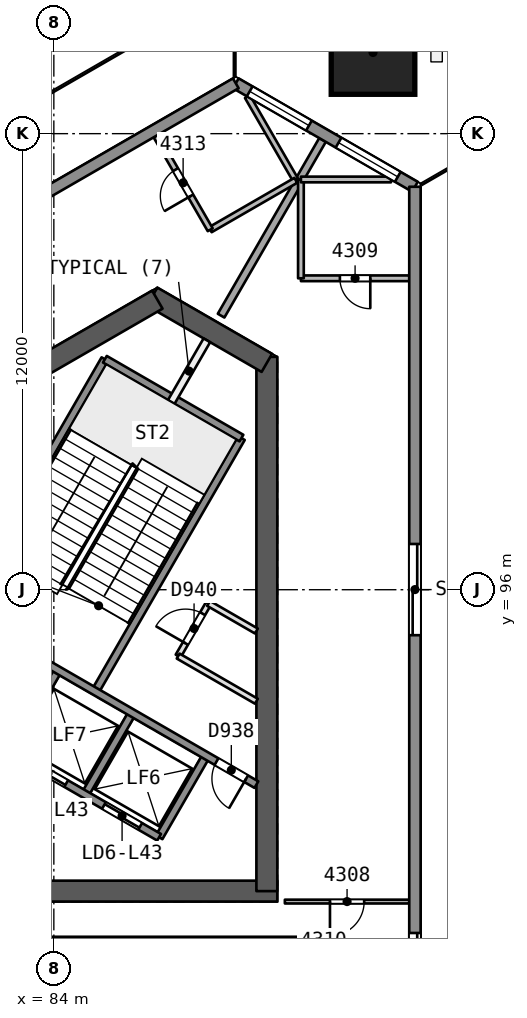
"""IFC4 building model, lengths in metres.
Left out: names, types, materials, properties, quantities, classifications, styles, units other than length and angle.
Written with IfcOpenShell. Run it as: python <this file> out.ifc"""

import sys

from ifc_helpers import new_model, si_unit, direction, frame, frame_2d, origin, origin_2d, place, context, subcontext, project, spatial, rectangle, extrude, element, fill, save


model = new_model("IFC4")
c1 = context("Model", 3, precision=1e-05, world=origin(), true_north=direction((0.0, 1.0)))
c2 = subcontext(c1, "Body", "Model", "MODEL_VIEW")
j1 = project(units=[si_unit("LENGTHUNIT", "METRE"), si_unit("PLANEANGLEUNIT", "RADIAN")], contexts=[c1])
p1 = place(None, origin())
s1 = spatial("IfcSite", under=j1, at=p1, CompositionType="ELEMENT")
p2 = place(p1, origin())
s2 = spatial("IfcBuilding", under=s1, at=p2, CompositionType="ELEMENT")
p3 = place(p2, frame((0.0, 0.0, 178.5)))
s3 = spatial("IfcBuildingStorey", under=s2, at=p3, CompositionType="ELEMENT", Elevation=178.5)
p4 = place(p3, frame((79.659, 88.069, 0.0), z_axis=(0.0, 0.0, 1.0), x_axis=(1.0, 0.0, 0.0)))
e1 = element("IfcWall", 1, at=p4, inside=s3, PredefinedType="SHEAR", context=c2, shape_type="SweptSolid", body=[
    extrude(rectangle(XDim=10.221, YDim=0.55, at=frame_2d((5.111, 0.0))), origin(), (0.0, 0.0, 1.0), 3.7),
])
p5 = place(p4, frame((0.791, 0.0, 0.0)))
e2 = element("IfcOpeningElement", 2, at=p5, cuts=e1, PredefinedType="OPENING", context=c2, shape_type="SweptSolid", body=[
    extrude(rectangle(XDim=1.2, YDim=2.1, at=frame_2d((0.6, 1.05))), frame((0.0, 0.286, 0.0), z_axis=(0.0, -1.0, 0.0), x_axis=(1.0, 0.0, 0.0)), (0.0, 0.0, 1.0), 0.571),
])
p6 = place(p3, frame((89.605, 88.069, 0.0), z_axis=(0.0, 0.0, 1.0), x_axis=(0.0, 1.0, 0.0)))
e3 = element("IfcWall", 3, at=p6, inside=s3, PredefinedType="SHEAR", context=c2, shape_type="SweptSolid", body=[
    extrude(rectangle(XDim=14.058, YDim=0.55, at=frame_2d((7.029, 0.0))), origin(), (0.0, 0.0, 1.0), 3.7),
])
p7 = place(p3, frame((89.605, 101.969, 0.0), z_axis=(0.0, 0.0, 1.0), x_axis=(-0.865997833373, 0.500047750313, 0.0)))
e4 = element("IfcWall", 4, at=p7, inside=s3, PredefinedType="SHEAR", context=c2, shape_type="SweptSolid", body=[
    extrude(rectangle(XDim=3.487, YDim=0.55, at=frame_2d((1.743, 0.0))), origin(), (0.0, 0.0, 1.0), 3.7),
])
p8 = place(p3, frame((86.723, 103.633, 0.0), z_axis=(0.0, 0.0, 1.0), x_axis=(-0.866023530946, -0.500003243837, 0.0)))
e5 = element("IfcWall", 5, at=p8, inside=s3, PredefinedType="SHEAR", context=c2, shape_type="SweptSolid", body=[
    extrude(rectangle(XDim=14.175, YDim=0.55, at=frame_2d((7.087, 0.0))), origin(), (0.0, 0.0, 1.0), 3.7),
])
p9 = place(p3, frame((92.42, 110.172, 0.0), z_axis=(-0.017607001884, -0.030531992032, 0.999378702468), x_axis=(0.499253360369, 0.865738917404, 0.035244986208)))
e6 = element("IfcColumn", 6, at=p9, inside=s3, PredefinedType="COLUMN", context=c2, shape_type="SweptSolid", body=[
    extrude(rectangle(XDim=2.2, YDim=2.2, at=origin_2d()), origin(), (0.0, 0.0, 1.0), 3.702),
])
p10 = place(p3, frame((93.353, 87.794, 0.0), z_axis=(0.0, 0.0, 1.0), x_axis=(-1.0, 0.0, 0.0)))
e7 = element("IfcWall", 7, at=p10, inside=s3, PredefinedType="PARTITIONING", context=c2, shape_type="SweptSolid", body=[
    extrude(rectangle(XDim=3.274, YDim=0.1, at=frame_2d((1.637, 0.0))), origin(), (0.0, 0.0, 1.0), 3.25),
])
p11 = place(p10, frame((1.187, 0.0, 0.0)))
e8 = element("IfcOpeningElement", 8, at=p11, cuts=e7, PredefinedType="OPENING", context=c2, shape_type="SweptSolid", body=[
    extrude(rectangle(XDim=0.9, YDim=2.1, at=frame_2d((0.45, 1.05))), frame((0.0, 0.061, 0.0), z_axis=(0.0, -1.0, 0.0), x_axis=(1.0, 0.0, 0.0)), (0.0, 0.0, 1.0), 0.121),
])
p12 = place(p3, frame((82.1, 86.768, 0.0), z_axis=(0.0, 0.0, 1.0), x_axis=(1.0, 0.0, 0.0)))
e9 = element("IfcWall", 9, at=p12, inside=s3, PredefinedType="PARTITIONING", context=c2, shape_type="SweptSolid", body=[
    extrude(rectangle(XDim=9.0, YDim=0.2, at=frame_2d((4.5, 0.0))), origin(), (0.0, 0.0, 1.0), 3.25),
])
p13 = place(p3, frame((93.353, 104.194, 0.0), z_axis=(0.0, 0.0, 1.0), x_axis=(-1.0, 0.0, 0.0)))
e10 = element("IfcWall", 10, at=p13, inside=s3, PredefinedType="PARTITIONING", context=c2, shape_type="SweptSolid", body=[
    extrude(rectangle(XDim=2.852, YDim=0.15, at=frame_2d((1.426, 0.0))), origin(), (0.0, 0.0, 1.0), 3.25),
])
p14 = place(p13, frame((1.026, 0.0, 0.0)))
e11 = element("IfcOpeningElement", 11, at=p14, cuts=e10, PredefinedType="OPENING", context=c2, shape_type="SweptSolid", body=[
    extrude(rectangle(XDim=0.8, YDim=2.1, at=frame_2d((0.4, 1.05))), frame((0.0, 0.085, 0.0), z_axis=(0.0, -1.0, 0.0), x_axis=(1.0, 0.0, 0.0)), (0.0, 0.0, 1.0), 0.171),
])
p15 = place(p3, frame((90.501, 104.194, 0.0), z_axis=(0.0, 0.0, 1.0), x_axis=(0.0, 1.0, 0.0)))
e12 = element("IfcWall", 12, at=p15, inside=s3, PredefinedType="PARTITIONING", context=c2, shape_type="SweptSolid", body=[
    extrude(rectangle(XDim=2.6, YDim=0.15, at=frame_2d((1.3, 0.0))), origin(), (0.0, 0.0, 1.0), 3.25),
])
p16 = place(p3, frame((90.501, 106.794, 0.0), z_axis=(0.0, 0.0, 1.0), x_axis=(1.0, 0.0, 0.0)))
e13 = element("IfcWall", 13, at=p16, inside=s3, PredefinedType="PARTITIONING", context=c2, shape_type="SweptSolid", body=[
    extrude(rectangle(XDim=2.371, YDim=0.15, at=frame_2d((1.186, 0.0))), origin(), (0.0, 0.0, 1.0), 3.25),
])
p17 = place(p3, frame((91.07, 107.835, 0.0), z_axis=(0.0, 0.0, 1.0), x_axis=(-0.499970524249, -0.866042420948, 0.0)))
e14 = element("IfcWall", 14, at=p17, inside=s3, PredefinedType="PARTITIONING", context=c2, shape_type="SweptSolid", body=[
    extrude(rectangle(XDim=5.339, YDim=0.2, at=frame_2d((2.669, 0.0))), origin(), (0.0, 0.0, 1.0), 3.25),
])
p18 = place(p3, frame((89.094, 108.976, 0.0), z_axis=(0.0, 0.0, 1.0), x_axis=(0.499935570486, -0.866062598986, 0.0)))
e15 = element("IfcWall", 15, at=p18, inside=s3, PredefinedType="PARTITIONING", context=c2, shape_type="SweptSolid", body=[
    extrude(rectangle(XDim=2.545, YDim=0.15, at=frame_2d((1.272, 0.0))), origin(), (0.0, 0.0, 1.0), 3.25),
])
p19 = place(p3, frame((90.366, 106.771, 0.0), z_axis=(0.0, 0.0, 1.0), x_axis=(-0.865997922154, -0.500047596559, 0.0)))
e16 = element("IfcWall", 16, at=p19, inside=s3, PredefinedType="PARTITIONING", context=c2, shape_type="SweptSolid", body=[
    extrude(rectangle(XDim=2.6, YDim=0.15, at=frame_2d((1.3, 0.0))), origin(), (0.0, 0.0, 1.0), 3.25),
])
p20 = place(p3, frame((88.115, 105.471, 0.0), z_axis=(0.0, 0.0, 1.0), x_axis=(-0.500006551472, 0.866021621257, 0.0)))
e17 = element("IfcWall", 17, at=p20, inside=s3, PredefinedType="PARTITIONING", context=c2, shape_type="SweptSolid", body=[
    extrude(rectangle(XDim=2.852, YDim=0.15, at=frame_2d((1.426, 0.0))), origin(), (0.0, 0.0, 1.0), 3.25),
])
p21 = place(p20, frame((1.026, 0.0, 0.0)))
e18 = element("IfcOpeningElement", 18, at=p21, cuts=e17, PredefinedType="OPENING", context=c2, shape_type="SweptSolid", body=[
    extrude(rectangle(XDim=0.8, YDim=2.1, at=frame_2d((0.4, 1.05))), frame((0.0, 0.085, 0.0), z_axis=(0.0, -1.0, 0.0), x_axis=(1.0, 0.0, 0.0)), (0.0, 0.0, 1.0), 0.171),
])
p22 = place(p3, frame((88.788, 109.324, 0.0), z_axis=(0.0, 0.0, 1.0), x_axis=(0.866026498114, -0.499998104561, 0.0)))
e19 = element("IfcWall", 19, at=p22, inside=s3, PredefinedType="SOLIDWALL", context=c2, shape_type="SweptSolid", body=[
    extrude(rectangle(XDim=5.443, YDim=0.3, at=frame_2d((2.722, 0.0))), origin(), (0.0, 0.0, 1.0), 3.25),
])
p23 = place(p22, frame((3.122, 0.0, 0.9)))
e20 = element("IfcOpeningElement", 20, at=p23, cuts=e19, PredefinedType="OPENING", context=c2, shape_type="SweptSolid", body=[
    extrude(rectangle(XDim=1.8, YDim=1.5, at=frame_2d((0.9, 0.75))), frame((0.0, 0.161, 0.0), z_axis=(0.0, -1.0, 0.0), x_axis=(1.0, 0.0, 0.0)), (0.0, 0.0, 1.0), 0.321),
])
p24 = place(p22, frame((0.423, 0.0, 0.9)))
e21 = element("IfcOpeningElement", 21, at=p24, cuts=e19, PredefinedType="OPENING", context=c2, shape_type="SweptSolid", body=[
    extrude(rectangle(XDim=1.8, YDim=1.5, at=frame_2d((0.9, 0.75))), frame((0.0, 0.161, 0.0), z_axis=(0.0, -1.0, 0.0), x_axis=(1.0, 0.0, 0.0)), (0.0, 0.0, 1.0), 0.321),
])
p25 = place(p3, frame((93.502, 106.603, 0.0), z_axis=(0.0, 0.0, 1.0), x_axis=(0.0, -1.0, 0.0)))
e22 = element("IfcWall", 22, at=p25, inside=s3, PredefinedType="SOLIDWALL", context=c2, shape_type="SweptSolid", body=[
    extrude(rectangle(XDim=53.206, YDim=0.3, at=frame_2d((26.603, 0.0))), origin(), (0.0, 0.0, 1.0), 3.25),
])
p26 = place(p25, frame((31.015, 0.0, 0.0)))
e23 = element("IfcOpeningElement", 23, at=p26, cuts=e22, PredefinedType="OPENING", context=c2, shape_type="SweptSolid", body=[
    extrude(rectangle(XDim=2.4, YDim=2.4, at=frame_2d((1.2, 1.2))), frame((0.0, 0.161, 0.0), z_axis=(0.0, -1.0, 0.0), x_axis=(1.0, 0.0, 0.0)), (0.0, 0.0, 1.0), 0.321),
])
p27 = place(p25, frame((41.356, 0.0, 0.0)))
e24 = element("IfcOpeningElement", 24, at=p27, cuts=e22, PredefinedType="OPENING", context=c2, shape_type="SweptSolid", body=[
    extrude(rectangle(XDim=2.4, YDim=2.4, at=frame_2d((1.2, 1.2))), frame((0.0, 0.161, 0.0), z_axis=(0.0, -1.0, 0.0), x_axis=(1.0, 0.0, 0.0)), (0.0, 0.0, 1.0), 0.321),
])
p28 = place(p25, frame((19.635, 0.0, 0.0)))
e25 = element("IfcOpeningElement", 25, at=p28, cuts=e22, PredefinedType="OPENING", context=c2, shape_type="SweptSolid", body=[
    extrude(rectangle(XDim=2.4, YDim=2.4, at=frame_2d((1.2, 1.2))), frame((0.0, 0.161, 0.0), z_axis=(0.0, -1.0, 0.0), x_axis=(1.0, 0.0, 0.0)), (0.0, 0.0, 1.0), 0.321),
])
p29 = place(p25, frame((9.4, 0.0, 0.0)))
e26 = element("IfcOpeningElement", 26, at=p29, cuts=e22, PredefinedType="OPENING", context=c2, shape_type="SweptSolid", body=[
    extrude(rectangle(XDim=2.4, YDim=2.4, at=frame_2d((1.2, 1.2))), frame((0.0, 0.161, 0.0), z_axis=(0.0, -1.0, 0.0), x_axis=(1.0, 0.0, 0.0)), (0.0, 0.0, 1.0), 0.321),
])
p30 = place(p25, frame((25.247, 0.0, 0.0)))
e27 = element("IfcOpeningElement", 27, at=p30, cuts=e22, PredefinedType="OPENING", context=c2, shape_type="SweptSolid", body=[
    extrude(rectangle(XDim=2.4, YDim=2.4, at=frame_2d((1.2, 1.2))), frame((0.0, 0.161, 0.0), z_axis=(0.0, -1.0, 0.0), x_axis=(1.0, 0.0, 0.0)), (0.0, 0.0, 1.0), 0.321),
])
p31 = place(p3, frame((42.71, 82.722, 0.0), z_axis=(0.0, 0.0, 1.0), x_axis=(0.866026647012, 0.499997846661, 0.0)))
e28 = element("IfcWall", 28, at=p31, inside=s3, PredefinedType="SOLIDWALL", context=c2, shape_type="SweptSolid", body=[
    extrude(rectangle(XDim=53.206, YDim=0.3, at=frame_2d((26.603, 0.0))), origin(), (0.0, 0.0, 1.0), 3.25),
])
p32 = place(p31, frame((30.391, 0.0, 0.0)))
e29 = element("IfcOpeningElement", 29, at=p32, cuts=e28, PredefinedType="OPENING", context=c2, shape_type="SweptSolid", body=[
    extrude(rectangle(XDim=2.4, YDim=2.4, at=frame_2d((1.2, 1.2))), frame((0.0, 0.161, 0.0), z_axis=(0.0, -1.0, 0.0), x_axis=(1.0, 0.0, 0.0)), (0.0, 0.0, 1.0), 0.321),
])
p33 = place(p31, frame((41.356, 0.0, 0.0)))
e30 = element("IfcOpeningElement", 30, at=p33, cuts=e28, PredefinedType="OPENING", context=c2, shape_type="SweptSolid", body=[
    extrude(rectangle(XDim=2.4, YDim=2.4, at=frame_2d((1.2, 1.2))), frame((0.0, 0.161, 0.0), z_axis=(0.0, -1.0, 0.0), x_axis=(1.0, 0.0, 0.0)), (0.0, 0.0, 1.0), 0.321),
])
p34 = place(p31, frame((19.635, 0.0, 0.0)))
e31 = element("IfcOpeningElement", 31, at=p34, cuts=e28, PredefinedType="OPENING", context=c2, shape_type="SweptSolid", body=[
    extrude(rectangle(XDim=2.4, YDim=2.4, at=frame_2d((1.2, 1.2))), frame((0.0, 0.161, 0.0), z_axis=(0.0, -1.0, 0.0), x_axis=(1.0, 0.0, 0.0)), (0.0, 0.0, 1.0), 0.321),
])
p35 = place(p31, frame((9.4, 0.0, 0.0)))
e32 = element("IfcOpeningElement", 32, at=p35, cuts=e28, PredefinedType="OPENING", context=c2, shape_type="SweptSolid", body=[
    extrude(rectangle(XDim=2.4, YDim=2.4, at=frame_2d((1.2, 1.2))), frame((0.0, 0.161, 0.0), z_axis=(0.0, -1.0, 0.0), x_axis=(1.0, 0.0, 0.0)), (0.0, 0.0, 1.0), 0.321),
])
p36 = place(p31, frame((26.404, 0.0, 0.9)))
e33 = element("IfcOpeningElement", 33, at=p36, cuts=e28, PredefinedType="OPENING", context=c2, shape_type="SweptSolid", body=[
    extrude(rectangle(XDim=1.8, YDim=1.5, at=frame_2d((0.9, 0.75))), frame((0.0, 0.161, 0.0), z_axis=(0.0, -1.0, 0.0), x_axis=(1.0, 0.0, 0.0)), (0.0, 0.0, 1.0), 0.321),
])
p37 = place(p31, frame((23.442, 0.0, 0.9)))
e34 = element("IfcOpeningElement", 34, at=p37, cuts=e28, PredefinedType="OPENING", context=c2, shape_type="SweptSolid", body=[
    extrude(rectangle(XDim=1.8, YDim=1.5, at=frame_2d((0.9, 0.75))), frame((0.0, 0.161, 0.0), z_axis=(0.0, -1.0, 0.0), x_axis=(1.0, 0.0, 0.0)), (0.0, 0.0, 1.0), 0.321),
])
p38 = place(p3, frame((86.77, 89.486, 0.0), z_axis=(0.0, 0.0, 1.0), x_axis=(0.499961042966, 0.86604789447, 0.0)))
e35 = element("IfcWall", 35, at=p38, inside=s3, PredefinedType="SOLIDWALL", context=c2, shape_type="SweptSolid", body=[
    extrude(rectangle(XDim=2.48, YDim=0.2, at=frame_2d((1.24, 0.0))), origin(), (0.0, 0.0, 1.0), 3.25),
])
p39 = place(p3, frame((87.271, 94.254, 0.0), z_axis=(0.0, 0.0, 1.0), x_axis=(0.499995408039, 0.866028054938, 0.0)))
e36 = element("IfcWall", 36, at=p39, inside=s3, PredefinedType="PARTITIONING", context=c2, shape_type="SweptSolid", body=[
    extrude(rectangle(XDim=1.6, YDim=0.15, at=frame_2d((0.8, 0.0))), origin(), (0.0, 0.0, 1.0), 3.25),
])
p40 = place(p39, frame((0.387, 0.0, 0.0)))
e37 = element("IfcOpeningElement", 37, at=p40, cuts=e36, PredefinedType="OPENING", context=c2, shape_type="SweptSolid", body=[
    extrude(rectangle(XDim=0.9, YDim=2.1, at=frame_2d((0.45, 1.05))), frame((0.0, 0.085, 0.0), z_axis=(0.0, -1.0, 0.0), x_axis=(1.0, 0.0, 0.0)), (0.0, 0.0, 1.0), 0.171),
])
p41 = place(p3, frame((84.821, 90.611, 0.0), z_axis=(0.0, 0.0, 1.0), x_axis=(0.499961042966, 0.86604789447, 0.0)))
e38 = element("IfcWall", 38, at=p41, inside=s3, PredefinedType="SOLIDWALL", context=c2, shape_type="SweptSolid", body=[
    extrude(rectangle(XDim=2.48, YDim=0.2, at=frame_2d((1.24, 0.0))), origin(), (0.0, 0.0, 1.0), 3.25),
])
p42 = place(p3, frame((85.087, 93.321, 0.0), z_axis=(0.0, 0.0, 1.0), x_axis=(0.500019787375, 0.866013979237, 0.0)))
e39 = element("IfcWall", 39, at=p42, inside=s3, PredefinedType="SOLIDWALL", context=c2, shape_type="SweptSolid", body=[
    extrude(rectangle(XDim=7.7, YDim=0.2, at=frame_2d((3.85, 0.0))), origin(), (0.0, 0.0, 1.0), 3.25),
])
p43 = place(p3, frame((82.873, 91.736, 0.0), z_axis=(0.0, 0.0, 1.0), x_axis=(0.499961042966, 0.86604789447, 0.0)))
e40 = element("IfcWall", 40, at=p43, inside=s3, PredefinedType="SOLIDWALL", context=c2, shape_type="SweptSolid", body=[
    extrude(rectangle(XDim=2.48, YDim=0.2, at=frame_2d((1.24, 0.0))), origin(), (0.0, 0.0, 1.0), 3.25),
])
p44 = place(p3, frame((87.09, 100.94, 0.0), z_axis=(0.0, 0.0, 1.0), x_axis=(0.499951854219, 0.86605319898, 0.0)))
e41 = element("IfcWall", 41, at=p44, inside=s3, PredefinedType="PARTITIONING", context=c2, shape_type="SweptSolid", body=[
    extrude(rectangle(XDim=1.873, YDim=0.2, at=frame_2d((0.937, 0.0))), origin(), (0.0, 0.0, 1.0), 3.25),
])
p45 = place(p3, frame((81.493, 95.396, 0.0), z_axis=(0.0, 0.0, 1.0), x_axis=(0.500006057782, 0.866021906294, 0.0)))
e42 = element("IfcWall", 42, at=p45, inside=s3, PredefinedType="SOLIDWALL", context=c2, shape_type="SweptSolid", body=[
    extrude(rectangle(XDim=7.7, YDim=0.2, at=frame_2d((3.85, 0.0))), origin(), (0.0, 0.0, 1.0), 3.25),
])
p46 = place(p45, frame((0.55, 0.0, 0.0)))
e43 = element("IfcOpeningElement", 43, at=p46, cuts=e42, PredefinedType="OPENING", context=c2, shape_type="SweptSolid", body=[
    extrude(rectangle(XDim=1.1, YDim=2.1, at=frame_2d((0.55, 1.05))), frame((0.0, 0.11, 0.0), z_axis=(0.0, -1.0, 0.0), x_axis=(1.0, 0.0, 0.0)), (0.0, 0.0, 1.0), 0.221),
])
p47 = place(p3, frame((86.77, 89.486, 0.0), z_axis=(0.0, 0.0, 1.0), x_axis=(-0.86601811187, 0.500012629753, 0.0)))
e44 = element("IfcWall", 44, at=p47, inside=s3, PredefinedType="SOLIDWALL", context=c2, shape_type="SweptSolid", body=[
    extrude(rectangle(XDim=10.9, YDim=0.2, at=frame_2d((5.45, 0.0))), origin(), (0.0, 0.0, 1.0), 3.25),
])
p48 = place(p47, frame((0.575, 0.0, 0.0)))
e45 = element("IfcOpeningElement", 45, at=p48, cuts=e44, PredefinedType="OPENING", context=c2, shape_type="SweptSolid", body=[
    extrude(rectangle(XDim=1.1, YDim=2.1, at=frame_2d((0.55, 1.05))), frame((0.0, 0.11, 0.0), z_axis=(0.0, -1.0, 0.0), x_axis=(1.0, 0.0, 0.0)), (0.0, 0.0, 1.0), 0.221),
])
p49 = place(p47, frame((2.825, 0.0, 0.0)))
e46 = element("IfcOpeningElement", 46, at=p49, cuts=e44, PredefinedType="OPENING", context=c2, shape_type="SweptSolid", body=[
    extrude(rectangle(XDim=1.1, YDim=2.1, at=frame_2d((0.55, 1.05))), frame((0.0, 0.11, 0.0), z_axis=(0.0, -1.0, 0.0), x_axis=(1.0, 0.0, 0.0)), (0.0, 0.0, 1.0), 0.221),
])
p50 = place(p47, frame((5.075, 0.0, 0.0)))
e47 = element("IfcOpeningElement", 47, at=p50, cuts=e44, PredefinedType="OPENING", context=c2, shape_type="SweptSolid", body=[
    extrude(rectangle(XDim=1.1, YDim=2.1, at=frame_2d((0.55, 1.05))), frame((0.0, 0.11, 0.0), z_axis=(0.0, -1.0, 0.0), x_axis=(1.0, 0.0, 0.0)), (0.0, 0.0, 1.0), 0.221),
])
p51 = place(p47, frame((7.325, 0.0, 0.0)))
e48 = element("IfcOpeningElement", 48, at=p51, cuts=e44, PredefinedType="OPENING", context=c2, shape_type="SweptSolid", body=[
    extrude(rectangle(XDim=1.1, YDim=2.1, at=frame_2d((0.55, 1.05))), frame((0.0, 0.11, 0.0), z_axis=(0.0, -1.0, 0.0), x_axis=(1.0, 0.0, 0.0)), (0.0, 0.0, 1.0), 0.221),
])
p52 = place(p3, frame((89.33, 90.872, 0.0), z_axis=(0.0, 0.0, 1.0), x_axis=(-0.866027589512, 0.49999621419, 0.0)))
e49 = element("IfcWall", 49, at=p52, inside=s3, PredefinedType="SOLIDWALL", context=c2, shape_type="SweptSolid", body=[
    extrude(rectangle(XDim=10.524, YDim=0.2, at=frame_2d((5.262, 0.0))), origin(), (0.0, 0.0, 1.0), 3.25),
])
p53 = place(p52, frame((0.312, 0.0, 0.0)))
e50 = element("IfcOpeningElement", 50, at=p53, cuts=e49, PredefinedType="OPENING", context=c2, shape_type="SweptSolid", body=[
    extrude(rectangle(XDim=0.9, YDim=2.1, at=frame_2d((0.45, 1.05))), frame((0.0, 0.11, 0.0), z_axis=(0.0, -1.0, 0.0), x_axis=(1.0, 0.0, 0.0)), (0.0, 0.0, 1.0), 0.221),
])
p54 = place(p3, frame((89.33, 93.065, 0.0), z_axis=(0.0, 0.0, 1.0), x_axis=(-0.866041951395, 0.499971337603, 0.0)))
e51 = element("IfcWall", 51, at=p54, inside=s3, PredefinedType="PARTITIONING", context=c2, shape_type="SweptSolid", body=[
    extrude(rectangle(XDim=2.378, YDim=0.15, at=frame_2d((1.189, 0.0))), origin(), (0.0, 0.0, 1.0), 3.25),
])
p55 = place(p3, frame((89.33, 94.913, 0.0), z_axis=(0.0, 0.0, 1.0), x_axis=(-0.865981433661, 0.500076150755, 0.0)))
e52 = element("IfcWall", 52, at=p55, inside=s3, PredefinedType="PARTITIONING", context=c2, shape_type="SweptSolid", body=[
    extrude(rectangle(XDim=1.454, YDim=0.15, at=frame_2d((0.727, 0.0))), origin(), (0.0, 0.0, 1.0), 3.25),
])
p56 = place(p3, frame((88.937, 99.99, 0.0), z_axis=(0.0, 0.0, 1.0), x_axis=(-0.866004344652, 0.500036473714, 0.0)))
e53 = element("IfcWall", 53, at=p56, inside=s3, PredefinedType="SOLIDWALL", context=c2, shape_type="SweptSolid", body=[
    extrude(rectangle(XDim=4.15, YDim=0.2, at=frame_2d((2.075, 0.0))), origin(), (0.0, 0.0, 1.0), 3.25),
])
p57 = place(p11, origin())
e54 = element("IfcDoor", 54, at=p57, inside=s3, OperationType="SINGLE_SWING_RIGHT", PredefinedType="NOTDEFINED", context=c2, shape_type="SweptSolid", body=[
    extrude(rectangle(XDim=0.9, YDim=2.1, at=frame_2d((0.45, 1.05))), frame((0.0, 0.025, 0.0), z_axis=(0.0, -1.0, 0.0), x_axis=(1.0, 0.0, 0.0)), (0.0, 0.0, 1.0), 0.05),
])
fill(e8, e54)
p58 = place(p14, origin())
e55 = element("IfcDoor", 55, at=p58, inside=s3, OperationType="SINGLE_SWING_LEFT", PredefinedType="NOTDEFINED", context=c2, shape_type="SweptSolid", body=[
    extrude(rectangle(XDim=0.8, YDim=2.1, at=frame_2d((0.4, 1.05))), frame((0.0, 0.025, 0.0), z_axis=(0.0, -1.0, 0.0), x_axis=(1.0, 0.0, 0.0)), (0.0, 0.0, 1.0), 0.05),
])
fill(e11, e55)
p59 = place(p21, origin())
e56 = element("IfcDoor", 56, at=p59, inside=s3, OperationType="SINGLE_SWING_LEFT", PredefinedType="NOTDEFINED", context=c2, shape_type="SweptSolid", body=[
    extrude(rectangle(XDim=0.8, YDim=2.1, at=frame_2d((0.4, 1.05))), frame((0.0, 0.025, 0.0), z_axis=(0.0, -1.0, 0.0), x_axis=(1.0, 0.0, 0.0)), (0.0, 0.0, 1.0), 0.05),
])
fill(e18, e56)
p60 = place(p23, origin())
e57 = element("IfcWindow", 57, at=p60, inside=s3, PartitioningType="SINGLE_PANEL", PredefinedType="WINDOW", context=c2, shape_type="SweptSolid", body=[
    extrude(rectangle(XDim=1.8, YDim=1.5, at=frame_2d((0.9, 0.75))), frame((0.0, 0.03, 0.0), z_axis=(0.0, -1.0, 0.0), x_axis=(1.0, 0.0, 0.0)), (0.0, 0.0, 1.0), 0.06),
])
fill(e20, e57)
p61 = place(p24, origin())
e58 = element("IfcWindow", 58, at=p61, inside=s3, PartitioningType="SINGLE_PANEL", PredefinedType="WINDOW", context=c2, shape_type="SweptSolid", body=[
    extrude(rectangle(XDim=1.8, YDim=1.5, at=frame_2d((0.9, 0.75))), frame((0.0, 0.03, 0.0), z_axis=(0.0, -1.0, 0.0), x_axis=(1.0, 0.0, 0.0)), (0.0, 0.0, 1.0), 0.06),
])
fill(e21, e58)
p62 = place(p28, origin())
e59 = element("IfcDoor", 59, at=p62, inside=s3, OperationType="SLIDING_TO_LEFT", PredefinedType="NOTDEFINED", context=c2, shape_type="SweptSolid", body=[
    extrude(rectangle(XDim=2.4, YDim=2.4, at=frame_2d((1.2, 1.2))), frame((0.0, 0.025, 0.0), z_axis=(0.0, -1.0, 0.0), x_axis=(1.0, 0.0, 0.0)), (0.0, 0.0, 1.0), 0.05),
])
fill(e25, e59)
p63 = place(p29, origin())
e60 = element("IfcDoor", 60, at=p63, inside=s3, OperationType="SLIDING_TO_RIGHT", PredefinedType="NOTDEFINED", context=c2, shape_type="SweptSolid", body=[
    extrude(rectangle(XDim=2.4, YDim=2.4, at=frame_2d((1.2, 1.2))), frame((0.0, 0.025, 0.0), z_axis=(0.0, -1.0, 0.0), x_axis=(1.0, 0.0, 0.0)), (0.0, 0.0, 1.0), 0.05),
])
fill(e26, e60)
p64 = place(p48, origin())
e61 = element("IfcDoor", 61, at=p64, inside=s3, OperationType="SLIDING_TO_RIGHT", PredefinedType="NOTDEFINED", context=c2, shape_type="SweptSolid", body=[
    extrude(rectangle(XDim=1.1, YDim=2.1, at=frame_2d((0.55, 1.05))), frame((0.0, 0.025, 0.0), z_axis=(0.0, -1.0, 0.0), x_axis=(1.0, 0.0, 0.0)), (0.0, 0.0, 1.0), 0.05),
])
fill(e45, e61)
p65 = place(p49, origin())
e62 = element("IfcDoor", 62, at=p65, inside=s3, OperationType="SLIDING_TO_LEFT", PredefinedType="NOTDEFINED", context=c2, shape_type="SweptSolid", body=[
    extrude(rectangle(XDim=1.1, YDim=2.1, at=frame_2d((0.55, 1.05))), frame((0.0, 0.025, 0.0), z_axis=(0.0, -1.0, 0.0), x_axis=(1.0, 0.0, 0.0)), (0.0, 0.0, 1.0), 0.05),
])
fill(e46, e62)
p66 = place(p53, origin())
e63 = element("IfcDoor", 63, at=p66, inside=s3, OperationType="SINGLE_SWING_LEFT", PredefinedType="NOTDEFINED", context=c2, shape_type="SweptSolid", body=[
    extrude(rectangle(XDim=0.9, YDim=2.1, at=frame_2d((0.45, 1.05))), frame((0.0, 0.025, 0.0), z_axis=(0.0, -1.0, 0.0), x_axis=(1.0, 0.0, 0.0)), (0.0, 0.0, 1.0), 0.05),
])
fill(e50, e63)
p67 = place(p40, origin())
e64 = element("IfcDoor", 64, at=p67, inside=s3, OperationType="SINGLE_SWING_LEFT", PredefinedType="NOTDEFINED", context=c2, shape_type="SweptSolid", body=[
    extrude(rectangle(XDim=0.9, YDim=2.1, at=frame_2d((0.45, 1.05))), frame((0.0, 0.025, 0.0), z_axis=(0.0, -1.0, 0.0), x_axis=(1.0, 0.0, 0.0)), (0.0, 0.0, 1.0), 0.05),
])
fill(e37, e64)
save(model, sys.argv[1])
